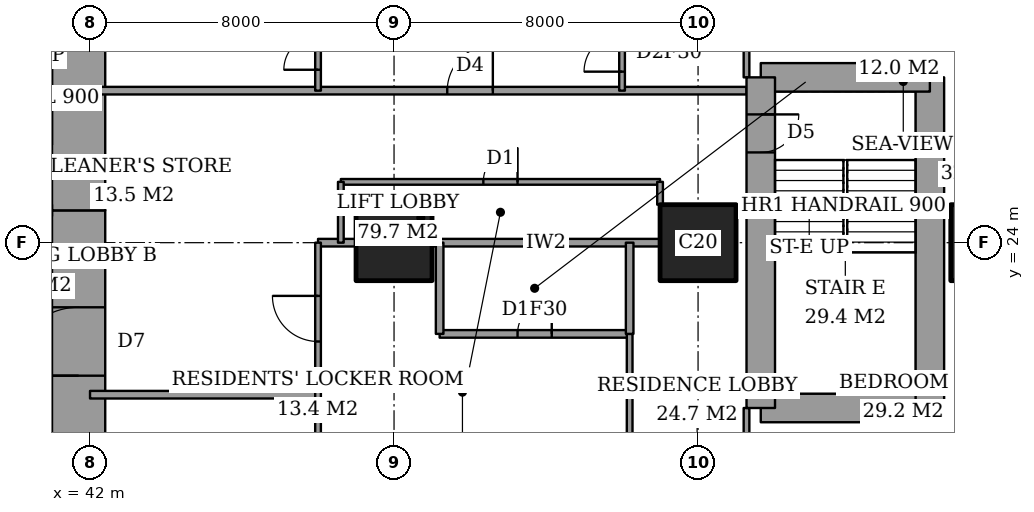
"""IFC4 building model, lengths in metres.
Left out: names, types, materials, properties, quantities, classifications, styles, units other than length and angle.
Written with IfcOpenShell. Run it as: python <this file> out.ifc"""

import sys

from ifc_helpers import new_model, si_unit, direction, frame, frame_2d, origin, origin_2d, place, context, subcontext, project, spatial, rectangle, extrude, element, fill, save


model = new_model("IFC4")
c1 = context("Model", 3, precision=1e-05, world=origin(), true_north=direction((0.0, 1.0)))
c2 = subcontext(c1, "Body", "Model", "MODEL_VIEW")
j1 = project(units=[si_unit("LENGTHUNIT", "METRE"), si_unit("PLANEANGLEUNIT", "RADIAN")], contexts=[c1])
p1 = place(None, origin())
s1 = spatial("IfcSite", under=j1, at=p1, CompositionType="ELEMENT")
p2 = place(p1, origin())
s2 = spatial("IfcBuilding", under=s1, at=p2, CompositionType="ELEMENT")
p3 = place(p2, frame((0.0, 0.0, 36.8)))
s3 = spatial("IfcBuildingStorey", under=s2, at=p3, CompositionType="ELEMENT", Elevation=36.8)
for number, where, z_axis, x_axis in (
    (1, (50.0, 24.0, 0.0), (0.0, 0.0, 1.0), (1.0, 0.0, 0.0)),
    (2, (58.0, 24.0, 0.0), (0.0, 0.0, 1.0), (1.0, 0.0, 0.0)),
    (3, (65.65, 24.0, 0.0), (0.0, 0.0, 1.0), (1.0, 0.0, 0.0)),
):
    element("IfcColumn", number, at=place(p3, frame(where, z_axis=z_axis, x_axis=x_axis)), inside=s3, PredefinedType="COLUMN", context=c2, shape_type="SweptSolid", body=[
        extrude(rectangle(XDim=2.0, YDim=2.0, at=origin_2d()), origin(), (0.0, 0.0, 1.0), 3.6),
    ])
p4 = place(p3, frame((41.7, 13.0, 0.0), z_axis=(0.0, 0.0, 1.0), x_axis=(0.0, 1.0, 0.0)))
e4 = element("IfcWall", 4, at=p4, inside=s3, PredefinedType="SHEAR", context=c2, shape_type="SweptSolid", body=[
    extrude(rectangle(XDim=11.85, YDim=1.4, at=frame_2d((5.925, 0.0))), origin(), (0.0, 0.0, 1.0), 3.6),
])
p5 = place(p4, frame((7.5, 0.0, 0.0)))
e5 = element("IfcOpeningElement", 5, at=p5, cuts=e4, PredefinedType="OPENING", context=c2, shape_type="SweptSolid", body=[
    extrude(rectangle(XDim=1.8, YDim=2.4, at=frame_2d((0.9, 1.2))), frame((0.0, 0.71, 0.0), z_axis=(0.0, -1.0, 0.0), x_axis=(1.0, 0.0, 0.0)), (0.0, 0.0, 1.0), 1.42),
])
p6 = place(p3, frame((41.7, 24.85, 0.0), z_axis=(0.0, 0.0, 1.0), x_axis=(0.0, 1.0, 0.0)))
e6 = element("IfcWall", 6, at=p6, inside=s3, PredefinedType="SHEAR", context=c2, shape_type="SweptSolid", body=[
    extrude(rectangle(XDim=10.15, YDim=1.4, at=frame_2d((5.075, 0.0))), origin(), (0.0, 0.0, 1.0), 3.6),
])
p7 = place(p3, frame((59.65, 19.65, 0.0), z_axis=(0.0, 0.0, 1.0), x_axis=(1.0, 0.0, 0.0)))
e7 = element("IfcWall", 7, at=p7, inside=s3, PredefinedType="SHEAR", context=c2, shape_type="SweptSolid", body=[
    extrude(rectangle(XDim=4.45, YDim=0.75, at=frame_2d((2.225, 0.0))), origin(), (0.0, 0.0, 1.0), 3.6),
])
p8 = place(p3, frame((64.1, 19.65, 0.0), z_axis=(0.0, 0.0, 1.0), x_axis=(0.0, 1.0, 0.0)))
e8 = element("IfcWall", 8, at=p8, inside=s3, PredefinedType="SHEAR", context=c2, shape_type="SweptSolid", body=[
    extrude(rectangle(XDim=8.7, YDim=0.75, at=frame_2d((4.35, 0.0))), origin(), (0.0, 0.0, 1.0), 3.6),
])
p9 = place(p3, frame((64.1, 28.35, 0.0), z_axis=(0.0, 0.0, 1.0), x_axis=(-1.0, 0.0, 0.0)))
e9 = element("IfcWall", 9, at=p9, inside=s3, PredefinedType="SHEAR", context=c2, shape_type="SweptSolid", body=[
    extrude(rectangle(XDim=4.45, YDim=0.75, at=frame_2d((2.225, 0.0))), origin(), (0.0, 0.0, 1.0), 3.6),
])
p10 = place(p3, frame((59.65, 28.35, 0.0), z_axis=(0.0, 0.0, 1.0), x_axis=(0.0, -1.0, 0.0)))
e10 = element("IfcWall", 10, at=p10, inside=s3, PredefinedType="SHEAR", context=c2, shape_type="SweptSolid", body=[
    extrude(rectangle(XDim=8.7, YDim=0.75, at=frame_2d((4.35, 0.0))), origin(), (0.0, 0.0, 1.0), 3.6),
])
p11 = place(p10, frame((0.975, 0.0, 0.0)))
e11 = element("IfcOpeningElement", 11, at=p11, cuts=e10, PredefinedType="OPENING", context=c2, shape_type="SweptSolid", body=[
    extrude(rectangle(XDim=1.0, YDim=2.1, at=frame_2d((0.5, 1.05))), frame((0.0, 0.385, 0.0), z_axis=(0.0, -1.0, 0.0), x_axis=(1.0, 0.0, 0.0)), (0.0, 0.0, 1.0), 0.77),
])
p12 = place(p3, frame((42.0, 20.0, 0.0), z_axis=(0.0, 0.0, 1.0), x_axis=(1.0, 0.0, 0.0)))
e12 = element("IfcWall", 12, at=p12, inside=s3, PredefinedType="PARTITIONING", context=c2, shape_type="SweptSolid", body=[
    extrude(rectangle(XDim=6.0, YDim=0.2, at=frame_2d((3.0, 0.0))), origin(), (0.0, 0.0, 1.0), 3.35),
])
p13 = place(p3, frame((51.2, 21.6, 0.0), z_axis=(0.0, 0.0, 1.0), x_axis=(1.0, 0.0, 0.0)))
e13 = element("IfcWall", 13, at=p13, inside=s3, PredefinedType="PARTITIONING", context=c2, shape_type="SweptSolid", body=[
    extrude(rectangle(XDim=5.0, YDim=0.2, at=frame_2d((2.5, 0.0))), origin(), (0.0, 0.0, 1.0), 3.35),
])
p14 = place(p13, frame((2.05, 0.0, 0.0)))
e14 = element("IfcOpeningElement", 14, at=p14, cuts=e13, PredefinedType="OPENING", context=c2, shape_type="SweptSolid", body=[
    extrude(rectangle(XDim=0.9, YDim=2.1, at=frame_2d((0.45, 1.05))), frame((0.0, 0.11, 0.0), z_axis=(0.0, -1.0, 0.0), x_axis=(1.0, 0.0, 0.0)), (0.0, 0.0, 1.0), 0.22),
])
p15 = place(p3, frame((48.0, 24.0, 0.0), z_axis=(0.0, 0.0, 1.0), x_axis=(1.0, 0.0, 0.0)))
e15 = element("IfcWall", 15, at=p15, inside=s3, PredefinedType="PARTITIONING", context=c2, shape_type="SweptSolid", body=[
    extrude(rectangle(XDim=1.0, YDim=0.2, at=frame_2d((0.5, 0.0))), origin(), (0.0, 0.0, 1.0), 3.35),
])
p16 = place(p3, frame((51.0, 24.0, 0.0), z_axis=(0.0, 0.0, 1.0), x_axis=(1.0, 0.0, 0.0)))
e16 = element("IfcWall", 16, at=p16, inside=s3, PredefinedType="PARTITIONING", context=c2, shape_type="SweptSolid", body=[
    extrude(rectangle(XDim=6.0, YDim=0.2, at=frame_2d((3.0, 0.0))), origin(), (0.0, 0.0, 1.0), 3.35),
])
p17 = place(p3, frame((48.6, 25.6, 0.0), z_axis=(0.0, 0.0, 1.0), x_axis=(1.0, 0.0, 0.0)))
e17 = element("IfcWall", 17, at=p17, inside=s3, PredefinedType="PARTITIONING", context=c2, shape_type="SweptSolid", body=[
    extrude(rectangle(XDim=8.4, YDim=0.15, at=frame_2d((4.2, 0.0))), origin(), (0.0, 0.0, 1.0), 3.35),
])
p18 = place(p17, frame((3.75, 0.0, 0.0)))
e18 = element("IfcOpeningElement", 18, at=p18, cuts=e17, PredefinedType="OPENING", context=c2, shape_type="SweptSolid", body=[
    extrude(rectangle(XDim=0.9, YDim=2.1, at=frame_2d((0.45, 1.05))), frame((0.0, 0.085, 0.0), z_axis=(0.0, -1.0, 0.0), x_axis=(1.0, 0.0, 0.0)), (0.0, 0.0, 1.0), 0.17),
])
p19 = place(p3, frame((42.0, 28.0, 0.0), z_axis=(0.0, 0.0, 1.0), x_axis=(1.0, 0.0, 0.0)))
e19 = element("IfcWall", 19, at=p19, inside=s3, PredefinedType="PARTITIONING", context=c2, shape_type="SweptSolid", body=[
    extrude(rectangle(XDim=17.275, YDim=0.2, at=frame_2d((8.637, 0.0))), origin(), (0.0, 0.0, 1.0), 3.35),
])
p20 = place(p19, frame((9.4, 0.0, 0.0)))
e20 = element("IfcOpeningElement", 20, at=p20, cuts=e19, PredefinedType="OPENING", context=c2, shape_type="SweptSolid", body=[
    extrude(rectangle(XDim=1.2, YDim=2.4, at=frame_2d((0.6, 1.2))), frame((0.0, 0.11, 0.0), z_axis=(0.0, -1.0, 0.0), x_axis=(1.0, 0.0, 0.0)), (0.0, 0.0, 1.0), 0.22),
])
p21 = place(p3, frame((48.0, 10.6, 0.0), z_axis=(0.0, 0.0, 1.0), x_axis=(0.0, 1.0, 0.0)))
e21 = element("IfcWall", 21, at=p21, inside=s3, PredefinedType="PARTITIONING", context=c2, shape_type="SweptSolid", body=[
    extrude(rectangle(XDim=13.4, YDim=0.15, at=frame_2d((6.7, 0.0))), origin(), (0.0, 0.0, 1.0), 3.35),
])
p22 = place(p21, frame((10.8, 0.0, 0.0)))
e22 = element("IfcOpeningElement", 22, at=p22, cuts=e21, PredefinedType="OPENING", context=c2, shape_type="SweptSolid", body=[
    extrude(rectangle(XDim=1.2, YDim=2.4, at=frame_2d((0.6, 1.2))), frame((0.0, 0.085, 0.0), z_axis=(0.0, -1.0, 0.0), x_axis=(1.0, 0.0, 0.0)), (0.0, 0.0, 1.0), 0.17),
])
p23 = place(p21, frame((6.7, 0.0, 0.0)))
e23 = element("IfcOpeningElement", 23, at=p23, cuts=e21, PredefinedType="OPENING", context=c2, shape_type="SweptSolid", body=[
    extrude(rectangle(XDim=0.9, YDim=2.1, at=frame_2d((0.45, 1.05))), frame((0.0, 0.085, 0.0), z_axis=(0.0, -1.0, 0.0), x_axis=(1.0, 0.0, 0.0)), (0.0, 0.0, 1.0), 0.17),
])
p24 = place(p3, frame((48.0, 28.0, 0.0), z_axis=(0.0, 0.0, 1.0), x_axis=(0.0, 1.0, 0.0)))
e24 = element("IfcWall", 24, at=p24, inside=s3, PredefinedType="PARTITIONING", context=c2, shape_type="SweptSolid", body=[
    extrude(rectangle(XDim=9.4, YDim=0.15, at=frame_2d((4.7, 0.0))), origin(), (0.0, 0.0, 1.0), 3.35),
])
p25 = place(p24, frame((0.55, 0.0, 0.0)))
e25 = element("IfcOpeningElement", 25, at=p25, cuts=e24, PredefinedType="OPENING", context=c2, shape_type="SweptSolid", body=[
    extrude(rectangle(XDim=0.9, YDim=2.1, at=frame_2d((0.45, 1.05))), frame((0.0, 0.085, 0.0), z_axis=(0.0, -1.0, 0.0), x_axis=(1.0, 0.0, 0.0)), (0.0, 0.0, 1.0), 0.17),
])
p26 = place(p3, frame((48.6, 24.0, 0.0), z_axis=(0.0, 0.0, 1.0), x_axis=(0.0, 1.0, 0.0)))
e26 = element("IfcWall", 26, at=p26, inside=s3, PredefinedType="PARTITIONING", context=c2, shape_type="SweptSolid", body=[
    extrude(rectangle(XDim=1.6, YDim=0.15, at=frame_2d((0.8, 0.0))), origin(), (0.0, 0.0, 1.0), 3.35),
])
p27 = place(p3, frame((51.2, 21.6, 0.0), z_axis=(0.0, 0.0, 1.0), x_axis=(0.0, 1.0, 0.0)))
e27 = element("IfcWall", 27, at=p27, inside=s3, PredefinedType="PARTITIONING", context=c2, shape_type="SweptSolid", body=[
    extrude(rectangle(XDim=2.4, YDim=0.2, at=frame_2d((1.2, 0.0))), origin(), (0.0, 0.0, 1.0), 3.35),
])
p28 = place(p3, frame((56.0, 28.0, 0.0), z_axis=(0.0, 0.0, 1.0), x_axis=(0.0, 1.0, 0.0)))
e28 = element("IfcWall", 28, at=p28, inside=s3, PredefinedType="PARTITIONING", context=c2, shape_type="SweptSolid", body=[
    extrude(rectangle(XDim=9.4, YDim=0.15, at=frame_2d((4.7, 0.0))), origin(), (0.0, 0.0, 1.0), 3.35),
])
p29 = place(p28, frame((0.5, 0.0, 0.0)))
e29 = element("IfcOpeningElement", 29, at=p29, cuts=e28, PredefinedType="OPENING", context=c2, shape_type="SweptSolid", body=[
    extrude(rectangle(XDim=1.0, YDim=2.1, at=frame_2d((0.5, 1.05))), frame((0.0, 0.085, 0.0), z_axis=(0.0, -1.0, 0.0), x_axis=(1.0, 0.0, 0.0)), (0.0, 0.0, 1.0), 0.17),
])
p30 = place(p3, frame((56.2, 21.6, 0.0), z_axis=(0.0, 0.0, 1.0), x_axis=(0.0, 1.0, 0.0)))
e30 = element("IfcWall", 30, at=p30, inside=s3, PredefinedType="PARTITIONING", context=c2, shape_type="SweptSolid", body=[
    extrude(rectangle(XDim=2.4, YDim=0.2, at=frame_2d((1.2, 0.0))), origin(), (0.0, 0.0, 1.0), 3.35),
])
p31 = place(p3, frame((56.2, 10.6, 0.0), z_axis=(0.0, 0.0, 1.0), x_axis=(0.0, 1.0, 0.0)))
e31 = element("IfcWall", 31, at=p31, inside=s3, PredefinedType="PARTITIONING", context=c2, shape_type="SweptSolid", body=[
    extrude(rectangle(XDim=11.0, YDim=0.15, at=frame_2d((5.5, 0.0))), origin(), (0.0, 0.0, 1.0), 3.35),
])
p32 = place(p31, frame((7.0, 0.0, 0.0)))
e32 = element("IfcOpeningElement", 32, at=p32, cuts=e31, PredefinedType="OPENING", context=c2, shape_type="SweptSolid", body=[
    extrude(rectangle(XDim=1.0, YDim=2.1, at=frame_2d((0.5, 1.05))), frame((0.0, 0.085, 0.0), z_axis=(0.0, -1.0, 0.0), x_axis=(1.0, 0.0, 0.0)), (0.0, 0.0, 1.0), 0.17),
])
p33 = place(p3, frame((57.0, 25.0, 0.0), z_axis=(0.0, 0.0, 1.0), x_axis=(0.0, 1.0, 0.0)))
e33 = element("IfcWall", 33, at=p33, inside=s3, PredefinedType="PARTITIONING", context=c2, shape_type="SweptSolid", body=[
    extrude(rectangle(XDim=0.6, YDim=0.15, at=frame_2d((0.3, 0.0))), origin(), (0.0, 0.0, 1.0), 3.35),
])
p34 = place(p3, frame((59.275, 17.2, 0.0), z_axis=(0.0, 0.0, 1.0), x_axis=(0.0, 1.0, 0.0)))
e34 = element("IfcWall", 34, at=p34, inside=s3, PredefinedType="PARTITIONING", context=c2, shape_type="SweptSolid", body=[
    extrude(rectangle(XDim=2.45, YDim=0.15, at=frame_2d((1.225, 0.0))), origin(), (0.0, 0.0, 1.0), 3.35),
])
p35 = place(p34, frame((0.538, 0.0, 0.0)))
e35 = element("IfcOpeningElement", 35, at=p35, cuts=e34, PredefinedType="OPENING", context=c2, shape_type="SweptSolid", body=[
    extrude(rectangle(XDim=1.0, YDim=2.1, at=frame_2d((0.5, 1.05))), frame((0.0, 0.085, 0.0), z_axis=(0.0, -1.0, 0.0), x_axis=(1.0, 0.0, 0.0)), (0.0, 0.0, 1.0), 0.17),
])
p36 = place(p3, frame((59.275, 28.35, 0.0), z_axis=(0.0, 0.0, 1.0), x_axis=(0.0, 1.0, 0.0)))
e36 = element("IfcWall", 36, at=p36, inside=s3, PredefinedType="PARTITIONING", context=c2, shape_type="SweptSolid", body=[
    extrude(rectangle(XDim=2.45, YDim=0.15, at=frame_2d((1.225, 0.0))), origin(), (0.0, 0.0, 1.0), 3.35),
])
p37 = place(p36, frame((0.913, 0.0, 0.0)))
e37 = element("IfcOpeningElement", 37, at=p37, cuts=e36, PredefinedType="OPENING", context=c2, shape_type="SweptSolid", body=[
    extrude(rectangle(XDim=1.0, YDim=2.1, at=frame_2d((0.5, 1.05))), frame((0.0, 0.085, 0.0), z_axis=(0.0, -1.0, 0.0), x_axis=(1.0, 0.0, 0.0)), (0.0, 0.0, 1.0), 0.17),
])
p38 = place(p14, origin())
e38 = element("IfcDoor", 38, at=p38, inside=s3, OperationType="SINGLE_SWING_LEFT", PredefinedType="DOOR", context=c2, shape_type="SweptSolid", body=[
    extrude(rectangle(XDim=0.9, YDim=2.1, at=frame_2d((0.45, 1.05))), frame((0.0, 0.025, 0.0), z_axis=(0.0, -1.0, 0.0), x_axis=(1.0, 0.0, 0.0)), (0.0, 0.0, 1.0), 0.05),
])
fill(e14, e38)
p39 = place(p22, origin())
e39 = element("IfcDoor", 39, at=p39, inside=s3, OperationType="SINGLE_SWING_LEFT", PredefinedType="DOOR", context=c2, shape_type="SweptSolid", body=[
    extrude(rectangle(XDim=1.2, YDim=2.4, at=frame_2d((0.6, 1.2))), frame((0.0, 0.025, 0.0), z_axis=(0.0, -1.0, 0.0), x_axis=(1.0, 0.0, 0.0)), (0.0, 0.0, 1.0), 0.05),
])
fill(e22, e39)
p40 = place(p29, origin())
e40 = element("IfcDoor", 40, at=p40, inside=s3, OperationType="SINGLE_SWING_RIGHT", PredefinedType="DOOR", context=c2, shape_type="SweptSolid", body=[
    extrude(rectangle(XDim=1.0, YDim=2.1, at=frame_2d((0.5, 1.05))), frame((0.0, 0.025, 0.0), z_axis=(0.0, -1.0, 0.0), x_axis=(1.0, 0.0, 0.0)), (0.0, 0.0, 1.0), 0.05),
])
fill(e29, e40)
p41 = place(p20, origin())
e41 = element("IfcDoor", 41, at=p41, inside=s3, OperationType="SINGLE_SWING_LEFT", PredefinedType="DOOR", context=c2, shape_type="SweptSolid", body=[
    extrude(rectangle(XDim=1.2, YDim=2.4, at=frame_2d((0.6, 1.2))), frame((0.0, 0.025, 0.0), z_axis=(0.0, -1.0, 0.0), x_axis=(1.0, 0.0, 0.0)), (0.0, 0.0, 1.0), 0.05),
])
fill(e20, e41)
p42 = place(p25, origin())
e42 = element("IfcDoor", 42, at=p42, inside=s3, OperationType="SINGLE_SWING_RIGHT", PredefinedType="DOOR", context=c2, shape_type="SweptSolid", body=[
    extrude(rectangle(XDim=0.9, YDim=2.1, at=frame_2d((0.45, 1.05))), frame((0.0, 0.025, 0.0), z_axis=(0.0, -1.0, 0.0), x_axis=(1.0, 0.0, 0.0)), (0.0, 0.0, 1.0), 0.05),
])
fill(e25, e42)
p43 = place(p18, origin())
e43 = element("IfcDoor", 43, at=p43, inside=s3, OperationType="SINGLE_SWING_LEFT", PredefinedType="DOOR", context=c2, shape_type="SweptSolid", body=[
    extrude(rectangle(XDim=0.9, YDim=2.1, at=frame_2d((0.45, 1.05))), frame((0.0, 0.025, 0.0), z_axis=(0.0, -1.0, 0.0), x_axis=(1.0, 0.0, 0.0)), (0.0, 0.0, 1.0), 0.05),
])
fill(e18, e43)
p44 = place(p5, origin())
e44 = element("IfcDoor", 44, at=p44, inside=s3, OperationType="DOUBLE_DOOR_DOUBLE_SWING", PredefinedType="DOOR", context=c2, shape_type="SweptSolid", body=[
    extrude(rectangle(XDim=1.8, YDim=2.4, at=frame_2d((0.9, 1.2))), frame((0.0, 0.025, 0.0), z_axis=(0.0, -1.0, 0.0), x_axis=(1.0, 0.0, 0.0)), (0.0, 0.0, 1.0), 0.05),
])
fill(e5, e44)
p45 = place(p11, origin())
e45 = element("IfcDoor", 45, at=p45, inside=s3, OperationType="SINGLE_SWING_RIGHT", PredefinedType="DOOR", context=c2, shape_type="SweptSolid", body=[
    extrude(rectangle(XDim=1.0, YDim=2.1, at=frame_2d((0.5, 1.05))), frame((0.0, 0.025, 0.0), z_axis=(0.0, -1.0, 0.0), x_axis=(1.0, 0.0, 0.0)), (0.0, 0.0, 1.0), 0.05),
])
fill(e11, e45)
save(model, sys.argv[1])
